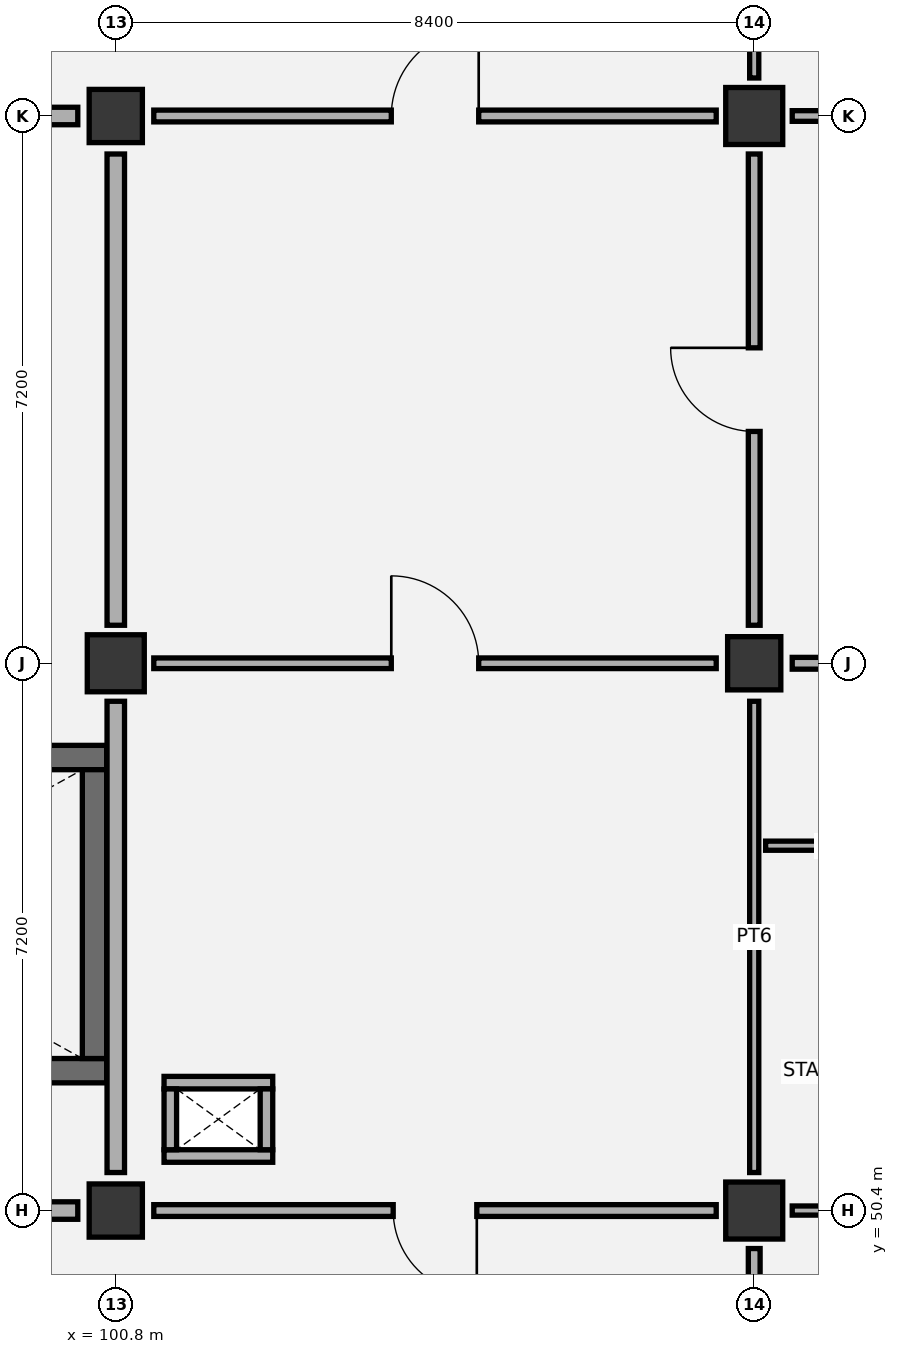
"""IFC4 building model, lengths in metres.
Left out: names, types, materials, properties, quantities, classifications, styles, units other than length and angle.
Written with IfcOpenShell. Run it as: python <this file> out.ifc"""

import sys

from ifc_helpers import new_model, si_unit, direction, frame, frame_2d, origin, origin_2d, place, context, subcontext, project, spatial, rectangle, extrude, element, fill, save


model = new_model("IFC4")
c1 = context("Model", 3, precision=1e-05, world=origin(), true_north=direction((0.0, 1.0)))
c2 = subcontext(c1, "Body", "Model", "MODEL_VIEW")
j1 = project(units=[si_unit("LENGTHUNIT", "METRE"), si_unit("PLANEANGLEUNIT", "RADIAN")], contexts=[c1])
p1 = place(None, origin())
s1 = spatial("IfcSite", under=j1, at=p1, CompositionType="ELEMENT")
p2 = place(p1, origin())
s2 = spatial("IfcBuilding", under=s1, at=p2, CompositionType="ELEMENT")
p3 = place(p2, frame((0.0, 0.0, 43.8)))
s3 = spatial("IfcBuildingStorey", under=s2, at=p3, CompositionType="ELEMENT", Elevation=43.8)
p4 = place(p3, frame((100.8, 50.4, 0.0), z_axis=(0.0, 0.0, 1.0), x_axis=(1.0, 0.0, 0.0)))
e1 = element("IfcColumn", 1, at=p4, inside=s3, PredefinedType="COLUMN", context=c2, shape_type="SweptSolid", body=[
    extrude(rectangle(XDim=0.7, YDim=0.7, at=origin_2d()), origin(), (0.0, 0.0, 1.0), 4.2),
])
p5 = place(p3, frame((100.8, 57.6, 0.0), z_axis=(0.0, 0.0, 1.0), x_axis=(1.0, 0.0, 0.0)))
e2 = element("IfcColumn", 2, at=p5, inside=s3, PredefinedType="COLUMN", context=c2, shape_type="SweptSolid", body=[
    extrude(rectangle(XDim=0.75, YDim=0.75, at=origin_2d()), origin(), (0.0, 0.0, 1.0), 4.2),
])
p6 = place(p3, frame((100.8, 64.8, 0.0), z_axis=(0.0, 0.0, 1.0), x_axis=(1.0, 0.0, 0.0)))
e3 = element("IfcColumn", 3, at=p6, inside=s3, PredefinedType="COLUMN", context=c2, shape_type="SweptSolid", body=[
    extrude(rectangle(XDim=0.7, YDim=0.7, at=origin_2d()), origin(), (0.0, 0.0, 1.0), 4.2),
])
p7 = place(p3, frame((109.2, 50.4, 0.0), z_axis=(0.0, 0.0, 1.0), x_axis=(1.0, 0.0, 0.0)))
e4 = element("IfcColumn", 4, at=p7, inside=s3, PredefinedType="COLUMN", context=c2, shape_type="SweptSolid", body=[
    extrude(rectangle(XDim=0.75, YDim=0.75, at=origin_2d()), origin(), (0.0, 0.0, 1.0), 4.2),
])
p8 = place(p3, frame((109.2, 57.6, 0.0), z_axis=(0.0, 0.0, 1.0), x_axis=(1.0, 0.0, 0.0)))
e5 = element("IfcColumn", 5, at=p8, inside=s3, PredefinedType="COLUMN", context=c2, shape_type="SweptSolid", body=[
    extrude(rectangle(XDim=0.7, YDim=0.7, at=origin_2d()), origin(), (0.0, 0.0, 1.0), 4.2),
])
p9 = place(p3, frame((109.2, 64.8, 0.0), z_axis=(0.0, 0.0, 1.0), x_axis=(1.0, 0.0, 0.0)))
e6 = element("IfcColumn", 6, at=p9, inside=s3, PredefinedType="COLUMN", context=c2, shape_type="SweptSolid", body=[
    extrude(rectangle(XDim=0.75, YDim=0.75, at=origin_2d()), origin(), (0.0, 0.0, 1.0), 4.2),
])
p10 = place(p3, frame((93.2, 52.24, 0.0), z_axis=(0.0, 0.0, 1.0), x_axis=(1.0, 0.0, 0.0)))
e7 = element("IfcWall", 7, at=p10, inside=s3, PredefinedType="SHEAR", context=c2, shape_type="SweptSolid", body=[
    extrude(rectangle(XDim=7.48, YDim=0.32, at=frame_2d((3.74, 0.0))), origin(), (0.0, 0.0, 1.0), 3.9),
])
p11 = place(p10, frame((0.45, 0.0, 0.0)))
e8 = element("IfcOpeningElement", 8, at=p11, cuts=e7, PredefinedType="OPENING", context=c2, shape_type="SweptSolid", body=[
    extrude(rectangle(XDim=1.05, YDim=2.15, at=frame_2d((0.525, 1.075))), frame((0.0, 0.17, 0.0), z_axis=(0.0, -1.0, 0.0), x_axis=(1.0, 0.0, 0.0)), (0.0, 0.0, 1.0), 0.34),
])
p12 = place(p3, frame((93.2, 56.36, 0.0), z_axis=(0.0, 0.0, 1.0), x_axis=(1.0, 0.0, 0.0)))
e9 = element("IfcWall", 9, at=p12, inside=s3, PredefinedType="SHEAR", context=c2, shape_type="SweptSolid", body=[
    extrude(rectangle(XDim=7.48, YDim=0.32, at=frame_2d((3.74, 0.0))), origin(), (0.0, 0.0, 1.0), 3.9),
])
p13 = place(p3, frame((100.52, 52.4, 0.0), z_axis=(0.0, 0.0, 1.0), x_axis=(0.0, 1.0, 0.0)))
e10 = element("IfcWall", 10, at=p13, inside=s3, PredefinedType="SHEAR", context=c2, shape_type="SweptSolid", body=[
    extrude(rectangle(XDim=3.8, YDim=0.32, at=frame_2d((1.9, 0.0))), origin(), (0.0, 0.0, 1.0), 3.9),
])
for number, where, z_axis, x_axis in (
    (11, (101.435, 51.117, 0.0), (0.0, 0.0, 1.0), (1.0, 0.0, 0.0)),
    (12, (101.435, 52.083, 0.0), (0.0, 0.0, 1.0), (1.0, 0.0, 0.0)),
):
    element("IfcWall", number, at=place(p3, frame(where, z_axis=z_axis, x_axis=x_axis)), inside=s3, PredefinedType="PARTITIONING", context=c2, shape_type="SweptSolid", body=[
        extrude(rectangle(XDim=1.43, YDim=0.165, at=frame_2d((0.715, 0.0))), origin(), (0.0, 0.0, 1.0), 3.9),
    ])
for number, where, z_axis, x_axis in (
    (13, (101.518, 51.2, 0.0), (0.0, 0.0, 1.0), (0.0, 1.0, 0.0)),
    (14, (102.782, 51.2, 0.0), (0.0, 0.0, 1.0), (0.0, 1.0, 0.0)),
):
    element("IfcWall", number, at=place(p3, frame(where, z_axis=z_axis, x_axis=x_axis)), inside=s3, PredefinedType="PARTITIONING", context=c2, shape_type="SweptSolid", body=[
        extrude(rectangle(XDim=0.8, YDim=0.165, at=frame_2d((0.4, 0.0))), origin(), (0.0, 0.0, 1.0), 3.9),
    ])
p14 = place(p3, frame((109.35, 55.2, 0.0), z_axis=(0.0, 0.0, 1.0), x_axis=(1.0, 0.0, 0.0)))
e15 = element("IfcWall", 15, at=p14, inside=s3, PredefinedType="PARTITIONING", context=c2, shape_type="SweptSolid", body=[
    extrude(rectangle(XDim=8.1, YDim=0.12, at=frame_2d((4.05, 0.0))), origin(), (0.0, 0.0, 1.0), 3.9),
])
p15 = place(p14, frame((1.08, 0.0, 0.0)))
e16 = element("IfcOpeningElement", 16, at=p15, cuts=e15, PredefinedType="OPENING", context=c2, shape_type="SweptSolid", body=[
    extrude(rectangle(XDim=0.95, YDim=2.1, at=frame_2d((0.475, 1.05))), frame((0.0, 0.07, 0.0), z_axis=(0.0, -1.0, 0.0), x_axis=(1.0, 0.0, 0.0)), (0.0, 0.0, 1.0), 0.14),
])
p16 = place(p14, frame((3.63, 0.0, 0.0)))
e17 = element("IfcOpeningElement", 17, at=p16, cuts=e15, PredefinedType="OPENING", context=c2, shape_type="SweptSolid", body=[
    extrude(rectangle(XDim=0.9, YDim=2.1, at=frame_2d((0.45, 1.05))), frame((0.0, 0.07, 0.0), z_axis=(0.0, -1.0, 0.0), x_axis=(1.0, 0.0, 0.0)), (0.0, 0.0, 1.0), 0.14),
])
p17 = place(p14, frame((6.13, 0.0, 0.0)))
e18 = element("IfcOpeningElement", 18, at=p17, cuts=e15, PredefinedType="OPENING", context=c2, shape_type="SweptSolid", body=[
    extrude(rectangle(XDim=1.0, YDim=2.1, at=frame_2d((0.5, 1.05))), frame((0.0, 0.07, 0.0), z_axis=(0.0, -1.0, 0.0), x_axis=(1.0, 0.0, 0.0)), (0.0, 0.0, 1.0), 0.14),
])
p18 = place(p3, frame((92.9, 50.4, 0.0), z_axis=(0.0, 0.0, 1.0), x_axis=(1.0, 0.0, 0.0)))
e19 = element("IfcWall", 19, at=p18, inside=s3, PredefinedType="PARTITIONING", context=c2, shape_type="SweptSolid", body=[
    extrude(rectangle(XDim=7.4, YDim=0.23, at=frame_2d((3.7, 0.0))), origin(), (0.0, 0.0, 1.0), 3.395),
])
p19 = place(p18, frame((2.95, 0.0, 0.0)))
e20 = element("IfcOpeningElement", 20, at=p19, cuts=e19, PredefinedType="OPENING", context=c2, shape_type="SweptSolid", body=[
    extrude(rectangle(XDim=1.5, YDim=2.15, at=frame_2d((0.75, 1.075))), frame((0.0, 0.125, 0.0), z_axis=(0.0, -1.0, 0.0), x_axis=(1.0, 0.0, 0.0)), (0.0, 0.0, 1.0), 0.25),
])
p20 = place(p3, frame((100.8, 50.9, 0.0), z_axis=(0.0, 0.0, 1.0), x_axis=(0.0, 1.0, 0.0)))
e21 = element("IfcWall", 21, at=p20, inside=s3, PredefinedType="PARTITIONING", context=c2, shape_type="SweptSolid", body=[
    extrude(rectangle(XDim=6.2, YDim=0.23, at=frame_2d((3.1, 0.0))), origin(), (0.0, 0.0, 1.0), 3.395),
])
p21 = place(p3, frame((100.8, 58.1, 0.0), z_axis=(0.0, 0.0, 1.0), x_axis=(0.0, 1.0, 0.0)))
e22 = element("IfcWall", 22, at=p21, inside=s3, PredefinedType="PARTITIONING", context=c2, shape_type="SweptSolid", body=[
    extrude(rectangle(XDim=6.2, YDim=0.23, at=frame_2d((3.1, 0.0))), origin(), (0.0, 0.0, 1.0), 3.345),
])
p22 = place(p3, frame((92.9, 64.8, 0.0), z_axis=(0.0, 0.0, 1.0), x_axis=(1.0, 0.0, 0.0)))
e23 = element("IfcWall", 23, at=p22, inside=s3, PredefinedType="PARTITIONING", context=c2, shape_type="SweptSolid", body=[
    extrude(rectangle(XDim=7.4, YDim=0.23, at=frame_2d((3.7, 0.0))), origin(), (0.0, 0.0, 1.0), 3.395),
])
p23 = place(p3, frame((109.2, 43.7, 0.0), z_axis=(0.0, 0.0, 1.0), x_axis=(0.0, 1.0, 0.0)))
e24 = element("IfcWall", 24, at=p23, inside=s3, PredefinedType="PARTITIONING", context=c2, shape_type="SweptSolid", body=[
    extrude(rectangle(XDim=6.2, YDim=0.155, at=frame_2d((3.1, 0.0))), origin(), (0.0, 0.0, 1.0), 3.395),
])
p24 = place(p23, frame((2.525, 0.0, 0.0)))
e25 = element("IfcOpeningElement", 25, at=p24, cuts=e24, PredefinedType="OPENING", context=c2, shape_type="SweptSolid", body=[
    extrude(rectangle(XDim=1.15, YDim=2.1, at=frame_2d((0.575, 1.05))), frame((0.0, 0.087, 0.0), z_axis=(0.0, -1.0, 0.0), x_axis=(1.0, 0.0, 0.0)), (0.0, 0.0, 1.0), 0.175),
])
p25 = place(p3, frame((101.3, 50.4, 0.0), z_axis=(0.0, 0.0, 1.0), x_axis=(1.0, 0.0, 0.0)))
e26 = element("IfcWall", 26, at=p25, inside=s3, PredefinedType="PARTITIONING", context=c2, shape_type="SweptSolid", body=[
    extrude(rectangle(XDim=7.4, YDim=0.155, at=frame_2d((3.7, 0.0))), origin(), (0.0, 0.0, 1.0), 3.445),
])
p26 = place(p25, frame((3.15, 0.0, 0.0)))
e27 = element("IfcOpeningElement", 27, at=p26, cuts=e26, PredefinedType="OPENING", context=c2, shape_type="SweptSolid", body=[
    extrude(rectangle(XDim=1.1, YDim=2.1, at=frame_2d((0.55, 1.05))), frame((0.0, 0.087, 0.0), z_axis=(0.0, -1.0, 0.0), x_axis=(1.0, 0.0, 0.0)), (0.0, 0.0, 1.0), 0.175),
])
p27 = place(p3, frame((109.2, 50.9, 0.0), z_axis=(0.0, 0.0, 1.0), x_axis=(0.0, 1.0, 0.0)))
e28 = element("IfcWall", 28, at=p27, inside=s3, PredefinedType="PARTITIONING", context=c2, shape_type="SweptSolid", body=[
    extrude(rectangle(XDim=6.2, YDim=0.12, at=frame_2d((3.1, 0.0))), origin(), (0.0, 0.0, 1.0), 3.345),
])
p28 = place(p3, frame((101.3, 57.6, 0.0), z_axis=(0.0, 0.0, 1.0), x_axis=(1.0, 0.0, 0.0)))
e29 = element("IfcWall", 29, at=p28, inside=s3, PredefinedType="PARTITIONING", context=c2, shape_type="SweptSolid", body=[
    extrude(rectangle(XDim=7.4, YDim=0.14, at=frame_2d((3.7, 0.0))), origin(), (0.0, 0.0, 1.0), 3.445),
])
p29 = place(p28, frame((3.125, 0.0, 0.0)))
e30 = element("IfcOpeningElement", 30, at=p29, cuts=e29, PredefinedType="OPENING", context=c2, shape_type="SweptSolid", body=[
    extrude(rectangle(XDim=1.15, YDim=2.1, at=frame_2d((0.575, 1.05))), frame((0.0, 0.08, 0.0), z_axis=(0.0, -1.0, 0.0), x_axis=(1.0, 0.0, 0.0)), (0.0, 0.0, 1.0), 0.16),
])
p30 = place(p3, frame((109.2, 58.1, 0.0), z_axis=(0.0, 0.0, 1.0), x_axis=(0.0, 1.0, 0.0)))
e31 = element("IfcWall", 31, at=p30, inside=s3, PredefinedType="PARTITIONING", context=c2, shape_type="SweptSolid", body=[
    extrude(rectangle(XDim=6.2, YDim=0.155, at=frame_2d((3.1, 0.0))), origin(), (0.0, 0.0, 1.0), 3.495),
])
p31 = place(p30, frame((2.55, 0.0, 0.0)))
e32 = element("IfcOpeningElement", 32, at=p31, cuts=e31, PredefinedType="OPENING", context=c2, shape_type="SweptSolid", body=[
    extrude(rectangle(XDim=1.1, YDim=2.1, at=frame_2d((0.55, 1.05))), frame((0.0, 0.087, 0.0), z_axis=(0.0, -1.0, 0.0), x_axis=(1.0, 0.0, 0.0)), (0.0, 0.0, 1.0), 0.175),
])
p32 = place(p3, frame((101.3, 64.8, 0.0), z_axis=(0.0, 0.0, 1.0), x_axis=(1.0, 0.0, 0.0)))
e33 = element("IfcWall", 33, at=p32, inside=s3, PredefinedType="PARTITIONING", context=c2, shape_type="SweptSolid", body=[
    extrude(rectangle(XDim=7.4, YDim=0.155, at=frame_2d((3.7, 0.0))), origin(), (0.0, 0.0, 1.0), 3.445),
])
p33 = place(p32, frame((3.125, 0.0, 0.0)))
e34 = element("IfcOpeningElement", 34, at=p33, cuts=e33, PredefinedType="OPENING", context=c2, shape_type="SweptSolid", body=[
    extrude(rectangle(XDim=1.15, YDim=2.1, at=frame_2d((0.575, 1.05))), frame((0.0, 0.087, 0.0), z_axis=(0.0, -1.0, 0.0), x_axis=(1.0, 0.0, 0.0)), (0.0, 0.0, 1.0), 0.175),
])
p34 = place(p3, frame((109.2, 65.3, 0.0), z_axis=(0.0, 0.0, 1.0), x_axis=(0.0, 1.0, 0.0)))
e35 = element("IfcWall", 35, at=p34, inside=s3, PredefinedType="PARTITIONING", context=c2, shape_type="SweptSolid", body=[
    extrude(rectangle(XDim=6.2, YDim=0.12, at=frame_2d((3.1, 0.0))), origin(), (0.0, 0.0, 1.0), 3.345),
])
p35 = place(p3, frame((109.7, 50.4, 0.0), z_axis=(0.0, 0.0, 1.0), x_axis=(1.0, 0.0, 0.0)))
e36 = element("IfcWall", 36, at=p35, inside=s3, PredefinedType="PARTITIONING", context=c2, shape_type="SweptSolid", body=[
    extrude(rectangle(XDim=7.4, YDim=0.12, at=frame_2d((3.7, 0.0))), origin(), (0.0, 0.0, 1.0), 3.295),
])
p36 = place(p3, frame((109.7, 57.6, 0.0), z_axis=(0.0, 0.0, 1.0), x_axis=(1.0, 0.0, 0.0)))
e37 = element("IfcWall", 37, at=p36, inside=s3, PredefinedType="PARTITIONING", context=c2, shape_type="SweptSolid", body=[
    extrude(rectangle(XDim=7.4, YDim=0.155, at=frame_2d((3.7, 0.0))), origin(), (0.0, 0.0, 1.0), 3.295),
])
p37 = place(p36, frame((3.15, 0.0, 0.0)))
e38 = element("IfcOpeningElement", 38, at=p37, cuts=e37, PredefinedType="OPENING", context=c2, shape_type="SweptSolid", body=[
    extrude(rectangle(XDim=1.1, YDim=2.1, at=frame_2d((0.55, 1.05))), frame((0.0, 0.087, 0.0), z_axis=(0.0, -1.0, 0.0), x_axis=(1.0, 0.0, 0.0)), (0.0, 0.0, 1.0), 0.175),
])
p38 = place(p3, frame((109.7, 64.8, 0.0), z_axis=(0.0, 0.0, 1.0), x_axis=(1.0, 0.0, 0.0)))
e39 = element("IfcWall", 39, at=p38, inside=s3, PredefinedType="PARTITIONING", context=c2, shape_type="SweptSolid", body=[
    extrude(rectangle(XDim=7.4, YDim=0.14, at=frame_2d((3.7, 0.0))), origin(), (0.0, 0.0, 1.0), 3.295),
])
p39 = place(p38, frame((3.125, 0.0, 0.0)))
e40 = element("IfcOpeningElement", 40, at=p39, cuts=e39, PredefinedType="OPENING", context=c2, shape_type="SweptSolid", body=[
    extrude(rectangle(XDim=1.15, YDim=2.1, at=frame_2d((0.575, 1.05))), frame((0.0, 0.08, 0.0), z_axis=(0.0, -1.0, 0.0), x_axis=(1.0, 0.0, 0.0)), (0.0, 0.0, 1.0), 0.16),
])
p40 = place(p26, frame((1.1, 0.0, 0.0), z_axis=(0.0, 0.0, 1.0), x_axis=(-1.0, 0.0, 0.0)))
e41 = element("IfcDoor", 41, at=p40, inside=s3, OperationType="SINGLE_SWING_LEFT", PredefinedType="DOOR", context=c2, shape_type="SweptSolid", body=[
    extrude(rectangle(XDim=1.1, YDim=2.1, at=frame_2d((0.55, 1.05))), frame((0.0, 0.025, 0.0), z_axis=(0.0, -1.0, 0.0), x_axis=(1.0, 0.0, 0.0)), (0.0, 0.0, 1.0), 0.05),
])
fill(e27, e41)
p41 = place(p29, origin())
e42 = element("IfcDoor", 42, at=p41, inside=s3, OperationType="SINGLE_SWING_LEFT", PredefinedType="DOOR", context=c2, shape_type="SweptSolid", body=[
    extrude(rectangle(XDim=1.15, YDim=2.1, at=frame_2d((0.575, 1.05))), frame((0.0, 0.025, 0.0), z_axis=(0.0, -1.0, 0.0), x_axis=(1.0, 0.0, 0.0)), (0.0, 0.0, 1.0), 0.05),
])
fill(e30, e42)
p42 = place(p31, origin())
e43 = element("IfcDoor", 43, at=p42, inside=s3, OperationType="SINGLE_SWING_RIGHT", PredefinedType="DOOR", context=c2, shape_type="SweptSolid", body=[
    extrude(rectangle(XDim=1.1, YDim=2.1, at=frame_2d((0.55, 1.05))), frame((0.0, 0.025, 0.0), z_axis=(0.0, -1.0, 0.0), x_axis=(1.0, 0.0, 0.0)), (0.0, 0.0, 1.0), 0.05),
])
fill(e32, e43)
p43 = place(p33, origin())
e44 = element("IfcDoor", 44, at=p43, inside=s3, OperationType="SINGLE_SWING_RIGHT", PredefinedType="DOOR", context=c2, shape_type="SweptSolid", body=[
    extrude(rectangle(XDim=1.15, YDim=2.1, at=frame_2d((0.575, 1.05))), frame((0.0, 0.025, 0.0), z_axis=(0.0, -1.0, 0.0), x_axis=(1.0, 0.0, 0.0)), (0.0, 0.0, 1.0), 0.05),
])
fill(e34, e44)
save(model, sys.argv[1])
